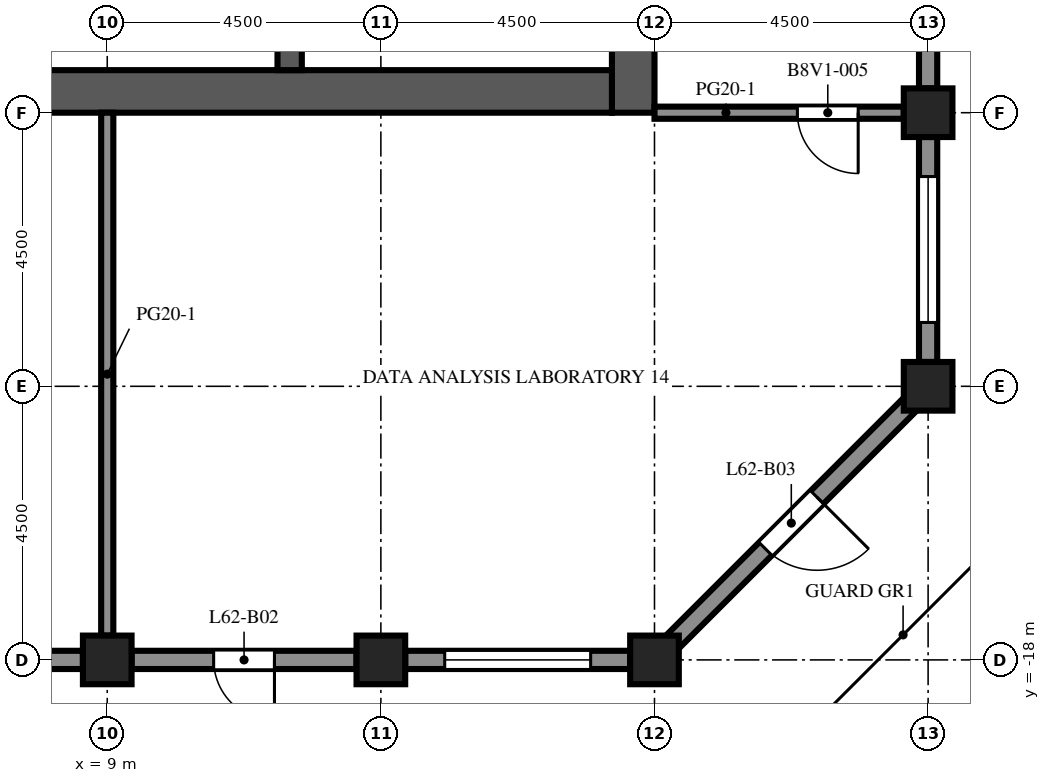
"""IFC4 building model, lengths in metres.
Left out: names, types, materials, properties, quantities, classifications, styles, units other than length and angle.
Written with IfcOpenShell. Run it as: python <this file> out.ifc"""

import sys

from ifc_helpers import new_model, si_unit, direction, frame, frame_2d, origin, origin_2d, place, context, subcontext, project, spatial, rectangle, extrude, element, fill, save


model = new_model("IFC4")
c1 = context("Model", 3, precision=1e-05, world=origin(), true_north=direction((0.0, 1.0)))
c2 = subcontext(c1, "Body", "Model", "MODEL_VIEW")
j1 = project(units=[si_unit("LENGTHUNIT", "METRE"), si_unit("PLANEANGLEUNIT", "RADIAN")], contexts=[c1])
p1 = place(None, origin())
s1 = spatial("IfcSite", under=j1, at=p1, CompositionType="ELEMENT")
p2 = place(p1, origin())
s2 = spatial("IfcBuilding", under=s1, at=p2, CompositionType="ELEMENT")
p3 = place(p2, frame((0.0, 0.0, 274.5)))
s3 = spatial("IfcBuildingStorey", under=s2, at=p3, CompositionType="ELEMENT", Elevation=274.5)
for number, where, z_axis, x_axis in (
    (1, (9.0, -18.0, 0.0), (0.0, 0.0, 1.0), (1.0, 0.0, 0.0)),
    (2, (13.5, -18.0, 0.0), (0.0, 0.0, 1.0), (1.0, 0.0, 0.0)),
    (3, (18.0, -18.0, 0.0), (0.0, 0.0, 1.0), (1.0, 0.0, 0.0)),
    (4, (22.5, -13.5, 0.0), (0.0, 0.0, 1.0), (1.0, 0.0, 0.0)),
    (5, (22.5, -9.0, 0.0), (0.0, 0.0, 1.0), (1.0, 0.0, 0.0)),
):
    element("IfcColumn", number, at=place(p3, frame(where, z_axis=z_axis, x_axis=x_axis)), inside=s3, PredefinedType="COLUMN", context=c2, shape_type="SweptSolid", body=[
        extrude(rectangle(XDim=0.8, YDim=0.8, at=origin_2d()), origin(), (0.0, 0.0, 1.0), 4.1),
    ])
p4 = place(p3, frame((17.65, -9.0, 0.0), z_axis=(0.0, 0.0, 1.0), x_axis=(0.0, 1.0, 0.0)))
e6 = element("IfcWall", 6, at=p4, inside=s3, PredefinedType="SHEAR", context=c2, shape_type="SweptSolid", body=[
    extrude(rectangle(XDim=27.5, YDim=0.7, at=frame_2d((13.75, 0.0))), origin(), (0.0, 0.0, 1.0), 4.1),
])
p5 = place(p4, frame((12.55, 0.0, 0.0)))
e7 = element("IfcOpeningElement", 7, at=p5, cuts=e6, PredefinedType="OPENING", context=c2, shape_type="SweptSolid", body=[
    extrude(rectangle(XDim=2.4, YDim=2.4, at=frame_2d((1.2, 1.2))), frame((0.0, 0.36, 0.0), z_axis=(0.0, -1.0, 0.0), x_axis=(1.0, 0.0, 0.0)), (0.0, 0.0, 1.0), 0.72),
])
p6 = place(p4, frame((6.825, 0.0, 0.0)))
e8 = element("IfcOpeningElement", 8, at=p6, cuts=e6, PredefinedType="OPENING", context=c2, shape_type="SweptSolid", body=[
    extrude(rectangle(XDim=1.2, YDim=2.1, at=frame_2d((0.6, 1.05))), frame((0.0, 0.36, 0.0), z_axis=(0.0, -1.0, 0.0), x_axis=(1.0, 0.0, 0.0)), (0.0, 0.0, 1.0), 0.72),
])
p7 = place(p4, frame((19.475, 0.0, 0.0)))
e9 = element("IfcOpeningElement", 9, at=p7, cuts=e6, PredefinedType="OPENING", context=c2, shape_type="SweptSolid", body=[
    extrude(rectangle(XDim=1.2, YDim=2.1, at=frame_2d((0.6, 1.05))), frame((0.0, 0.36, 0.0), z_axis=(0.0, -1.0, 0.0), x_axis=(1.0, 0.0, 0.0)), (0.0, 0.0, 1.0), 0.72),
])
p8 = place(p3, frame((6.7, -8.65, 0.0), z_axis=(0.0, 0.0, 1.0), x_axis=(1.0, 0.0, 0.0)))
e10 = element("IfcWall", 10, at=p8, inside=s3, PredefinedType="SHEAR", context=c2, shape_type="SweptSolid", body=[
    extrude(rectangle(XDim=10.6, YDim=0.7, at=frame_2d((5.3, 0.0))), origin(), (0.0, 0.0, 1.0), 4.1),
])
p9 = place(p3, frame((12.0, -8.3, 0.0), z_axis=(0.0, 0.0, 1.0), x_axis=(0.0, 1.0, 0.0)))
e11 = element("IfcWall", 11, at=p9, inside=s3, PredefinedType="SHEAR", context=c2, shape_type="SweptSolid", body=[
    extrude(rectangle(XDim=7.6, YDim=0.4, at=frame_2d((3.8, 0.0))), origin(), (0.0, 0.0, 1.0), 4.1),
])
p10 = place(p3, frame((8.6, -18.0, 0.0), z_axis=(0.0, 0.0, 1.0), x_axis=(-1.0, 0.0, 0.0)))
e12 = element("IfcWall", 12, at=p10, inside=s3, PredefinedType="SOLIDWALL", context=c2, shape_type="SweptSolid", body=[
    extrude(rectangle(XDim=3.7, YDim=0.3, at=frame_2d((1.85, 0.0))), origin(), (0.0, 0.0, 1.0), 2.85),
])
p11 = place(p10, frame((0.65, 0.0, 0.8)))
e13 = element("IfcOpeningElement", 13, at=p11, cuts=e12, PredefinedType="OPENING", context=c2, shape_type="SweptSolid", body=[
    extrude(rectangle(XDim=2.4, YDim=1.7, at=frame_2d((1.2, 0.85))), frame((0.0, 0.16, 0.0), z_axis=(0.0, -1.0, 0.0), x_axis=(1.0, 0.0, 0.0)), (0.0, 0.0, 1.0), 0.32),
])
p12 = place(p3, frame((13.1, -18.0, 0.0), z_axis=(0.0, 0.0, 1.0), x_axis=(-1.0, 0.0, 0.0)))
e14 = element("IfcWall", 14, at=p12, inside=s3, PredefinedType="SOLIDWALL", context=c2, shape_type="SweptSolid", body=[
    extrude(rectangle(XDim=3.7, YDim=0.3, at=frame_2d((1.85, 0.0))), origin(), (0.0, 0.0, 1.0), 2.85),
])
p13 = place(p12, frame((1.35, 0.0, 0.0)))
e15 = element("IfcOpeningElement", 15, at=p13, cuts=e14, PredefinedType="OPENING", context=c2, shape_type="SweptSolid", body=[
    extrude(rectangle(XDim=1.0, YDim=2.2, at=frame_2d((0.5, 1.1))), frame((0.0, 0.16, 0.0), z_axis=(0.0, -1.0, 0.0), x_axis=(1.0, 0.0, 0.0)), (0.0, 0.0, 1.0), 0.32),
])
p14 = place(p3, frame((17.6, -18.0, 0.0), z_axis=(0.0, 0.0, 1.0), x_axis=(-1.0, 0.0, 0.0)))
e16 = element("IfcWall", 16, at=p14, inside=s3, PredefinedType="SOLIDWALL", context=c2, shape_type="SweptSolid", body=[
    extrude(rectangle(XDim=3.7, YDim=0.3, at=frame_2d((1.85, 0.0))), origin(), (0.0, 0.0, 1.0), 2.85),
])
p15 = place(p14, frame((0.65, 0.0, 0.8)))
e17 = element("IfcOpeningElement", 17, at=p15, cuts=e16, PredefinedType="OPENING", context=c2, shape_type="SweptSolid", body=[
    extrude(rectangle(XDim=2.4, YDim=1.7, at=frame_2d((1.2, 0.85))), frame((0.0, 0.16, 0.0), z_axis=(0.0, -1.0, 0.0), x_axis=(1.0, 0.0, 0.0)), (0.0, 0.0, 1.0), 0.32),
])
p16 = place(p3, frame((22.206, -13.794, 0.0), z_axis=(0.0, 0.0, 1.0), x_axis=(-0.707106781187, -0.707106781187, 0.0)))
e18 = element("IfcWall", 18, at=p16, inside=s3, PredefinedType="SOLIDWALL", context=c2, shape_type="SweptSolid", body=[
    extrude(rectangle(XDim=5.532, YDim=0.3, at=frame_2d((2.766, 0.0))), origin(), (0.0, 0.0, 1.0), 2.85),
])
p17 = place(p16, frame((2.166, 0.0, 0.0)))
e19 = element("IfcOpeningElement", 19, at=p17, cuts=e18, PredefinedType="OPENING", context=c2, shape_type="SweptSolid", body=[
    extrude(rectangle(XDim=1.2, YDim=2.2, at=frame_2d((0.6, 1.1))), frame((0.0, 0.16, 0.0), z_axis=(0.0, -1.0, 0.0), x_axis=(1.0, 0.0, 0.0)), (0.0, 0.0, 1.0), 0.32),
])
p18 = place(p3, frame((22.5, -9.4, 0.0), z_axis=(0.0, 0.0, 1.0), x_axis=(0.0, -1.0, 0.0)))
e20 = element("IfcWall", 20, at=p18, inside=s3, PredefinedType="SOLIDWALL", context=c2, shape_type="SweptSolid", body=[
    extrude(rectangle(XDim=3.7, YDim=0.3, at=frame_2d((1.85, 0.0))), origin(), (0.0, 0.0, 1.0), 2.85),
])
p19 = place(p18, frame((0.65, 0.0, 0.8)))
e21 = element("IfcOpeningElement", 21, at=p19, cuts=e20, PredefinedType="OPENING", context=c2, shape_type="SweptSolid", body=[
    extrude(rectangle(XDim=2.4, YDim=1.7, at=frame_2d((1.2, 0.85))), frame((0.0, 0.16, 0.0), z_axis=(0.0, -1.0, 0.0), x_axis=(1.0, 0.0, 0.0)), (0.0, 0.0, 1.0), 0.32),
])
p20 = place(p3, frame((22.5, -4.9, 0.0), z_axis=(0.0, 0.0, 1.0), x_axis=(0.0, -1.0, 0.0)))
e22 = element("IfcWall", 22, at=p20, inside=s3, PredefinedType="SOLIDWALL", context=c2, shape_type="SweptSolid", body=[
    extrude(rectangle(XDim=3.7, YDim=0.3, at=frame_2d((1.85, 0.0))), origin(), (0.0, 0.0, 1.0), 2.85),
])
p21 = place(p20, frame((1.35, 0.0, 0.0)))
e23 = element("IfcOpeningElement", 23, at=p21, cuts=e22, PredefinedType="OPENING", context=c2, shape_type="SweptSolid", body=[
    extrude(rectangle(XDim=1.0, YDim=2.2, at=frame_2d((0.5, 1.1))), frame((0.0, 0.16, 0.0), z_axis=(0.0, -1.0, 0.0), x_axis=(1.0, 0.0, 0.0)), (0.0, 0.0, 1.0), 0.32),
])
p22 = place(p3, frame((9.0, -17.6, 0.0), z_axis=(0.0, 0.0, 1.0), x_axis=(0.0, 1.0, 0.0)))
e24 = element("IfcWall", 24, at=p22, inside=s3, PredefinedType="PARTITIONING", context=c2, shape_type="SweptSolid", body=[
    extrude(rectangle(XDim=8.6, YDim=0.2, at=frame_2d((4.3, 0.0))), origin(), (0.0, 0.0, 1.0), 3.65),
])
p23 = place(p3, frame((22.1, -9.0, 0.0), z_axis=(0.0, 0.0, 1.0), x_axis=(-1.0, 0.0, 0.0)))
e25 = element("IfcWall", 25, at=p23, inside=s3, PredefinedType="PARTITIONING", context=c2, shape_type="SweptSolid", body=[
    extrude(rectangle(XDim=4.1, YDim=0.2, at=frame_2d((2.05, 0.0))), origin(), (0.0, 0.0, 1.0), 3.65),
])
p24 = place(p23, frame((0.75, 0.0, 0.0)))
e26 = element("IfcOpeningElement", 26, at=p24, cuts=e25, PredefinedType="OPENING", context=c2, shape_type="SweptSolid", body=[
    extrude(rectangle(XDim=1.0, YDim=2.1, at=frame_2d((0.5, 1.05))), frame((0.0, 0.11, 0.0), z_axis=(0.0, -1.0, 0.0), x_axis=(1.0, 0.0, 0.0)), (0.0, 0.0, 1.0), 0.22),
])
p25 = place(p13, origin())
e27 = element("IfcDoor", 27, at=p25, inside=s3, OperationType="SINGLE_SWING_LEFT", PredefinedType="DOOR", context=c2, shape_type="SweptSolid", body=[
    extrude(rectangle(XDim=1.0, YDim=2.2, at=frame_2d((0.5, 1.1))), frame((0.0, 0.025, 0.0), z_axis=(0.0, -1.0, 0.0), x_axis=(1.0, 0.0, 0.0)), (0.0, 0.0, 1.0), 0.05),
])
fill(e15, e27)
p26 = place(p15, origin())
e28 = element("IfcWindow", 28, at=p26, inside=s3, PartitioningType="SINGLE_PANEL", PredefinedType="WINDOW", context=c2, shape_type="SweptSolid", body=[
    extrude(rectangle(XDim=2.4, YDim=1.7, at=frame_2d((1.2, 0.85))), frame((0.0, 0.03, 0.0), z_axis=(0.0, -1.0, 0.0), x_axis=(1.0, 0.0, 0.0)), (0.0, 0.0, 1.0), 0.06),
])
fill(e17, e28)
p27 = place(p17, origin())
e29 = element("IfcDoor", 29, at=p27, inside=s3, OperationType="SINGLE_SWING_LEFT", PredefinedType="DOOR", context=c2, shape_type="SweptSolid", body=[
    extrude(rectangle(XDim=1.2, YDim=2.2, at=frame_2d((0.6, 1.1))), frame((0.0, 0.025, 0.0), z_axis=(0.0, -1.0, 0.0), x_axis=(1.0, 0.0, 0.0)), (0.0, 0.0, 1.0), 0.05),
])
fill(e19, e29)
p28 = place(p19, origin())
e30 = element("IfcWindow", 30, at=p28, inside=s3, PartitioningType="SINGLE_PANEL", PredefinedType="WINDOW", context=c2, shape_type="SweptSolid", body=[
    extrude(rectangle(XDim=2.4, YDim=1.7, at=frame_2d((1.2, 0.85))), frame((0.0, 0.03, 0.0), z_axis=(0.0, -1.0, 0.0), x_axis=(1.0, 0.0, 0.0)), (0.0, 0.0, 1.0), 0.06),
])
fill(e21, e30)
p29 = place(p24, origin())
e31 = element("IfcDoor", 31, at=p29, inside=s3, OperationType="SINGLE_SWING_LEFT", PredefinedType="DOOR", context=c2, shape_type="SweptSolid", body=[
    extrude(rectangle(XDim=1.0, YDim=2.1, at=frame_2d((0.5, 1.05))), frame((0.0, 0.025, 0.0), z_axis=(0.0, -1.0, 0.0), x_axis=(1.0, 0.0, 0.0)), (0.0, 0.0, 1.0), 0.05),
])
fill(e26, e31)
save(model, sys.argv[1])
